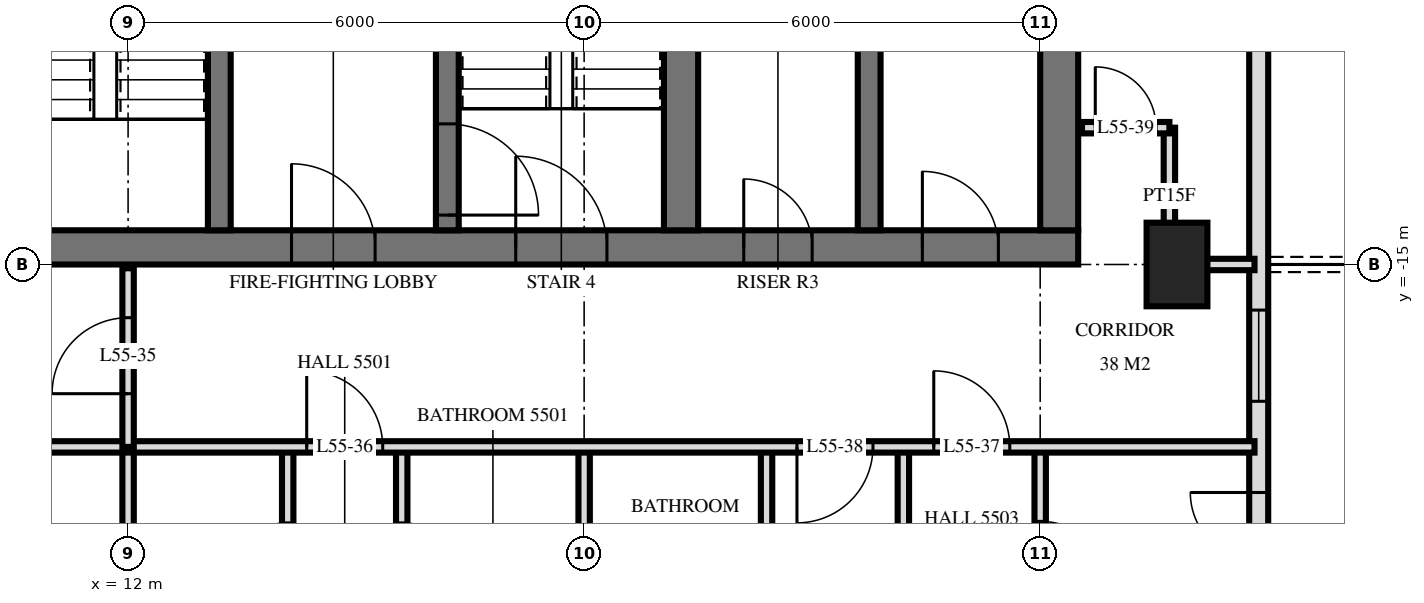
"""IFC4 building model, lengths in metres.
Left out: names, types, materials, properties, quantities, classifications, styles, units other than length and angle.
Written with IfcOpenShell. Run it as: python <this file> out.ifc"""

import sys

from ifc_helpers import new_model, si_unit, direction, frame, frame_2d, origin, origin_2d, place, context, subcontext, project, spatial, rectangle, extrude, element, fill, save


model = new_model("IFC4")
c1 = context("Model", 3, precision=1e-05, world=origin(), true_north=direction((0.0, 1.0)))
c2 = subcontext(c1, "Body", "Model", "MODEL_VIEW")
j1 = project(units=[si_unit("LENGTHUNIT", "METRE"), si_unit("PLANEANGLEUNIT", "RADIAN")], contexts=[c1])
p1 = place(None, origin())
s1 = spatial("IfcSite", under=j1, at=p1, CompositionType="ELEMENT")
p2 = place(p1, origin())
s2 = spatial("IfcBuilding", under=s1, at=p2, CompositionType="ELEMENT")
p3 = place(p2, frame((0.0, 0.0, 211.6)))
s3 = spatial("IfcBuildingStorey", under=s2, at=p3, CompositionType="ELEMENT", Elevation=211.6)
p4 = place(p3, frame((25.8, -15.0, 0.0), z_axis=(0.0, 0.0, 1.0), x_axis=(0.0, 1.0, 0.0)))
e1 = element("IfcColumn", 1, at=p4, inside=s3, PredefinedType="COLUMN", context=c2, shape_type="SweptSolid", body=[
    extrude(rectangle(XDim=1.1, YDim=0.8, at=origin_2d()), origin(), (0.0, 0.0, 1.0), 3.5),
])
p5 = place(p3, frame((10.0, -14.775, 0.0), z_axis=(0.0, 0.0, 1.0), x_axis=(1.0, 0.0, 0.0)))
e2 = element("IfcWall", 2, at=p5, inside=s3, PredefinedType="SHEAR", context=c2, shape_type="SweptSolid", body=[
    extrude(rectangle(XDim=14.5, YDim=0.45, at=frame_2d((7.25, 0.0))), origin(), (0.0, 0.0, 1.0), 3.5),
])
p6 = place(p5, frame((7.1, 0.0, 0.0)))
e3 = element("IfcOpeningElement", 3, at=p6, cuts=e2, PredefinedType="OPENING", context=c2, shape_type="SweptSolid", body=[
    extrude(rectangle(XDim=1.2, YDim=2.1, at=frame_2d((0.6, 1.05))), frame((0.0, 0.235, 0.0), z_axis=(0.0, -1.0, 0.0), x_axis=(1.0, 0.0, 0.0)), (0.0, 0.0, 1.0), 0.47),
])
p7 = place(p5, frame((4.15, 0.0, 0.0)))
e4 = element("IfcOpeningElement", 4, at=p7, cuts=e2, PredefinedType="OPENING", context=c2, shape_type="SweptSolid", body=[
    extrude(rectangle(XDim=1.1, YDim=2.1, at=frame_2d((0.55, 1.05))), frame((0.0, 0.235, 0.0), z_axis=(0.0, -1.0, 0.0), x_axis=(1.0, 0.0, 0.0)), (0.0, 0.0, 1.0), 0.47),
])
p8 = place(p5, frame((10.1, 0.0, 0.0)))
e5 = element("IfcOpeningElement", 5, at=p8, cuts=e2, PredefinedType="OPENING", context=c2, shape_type="SweptSolid", body=[
    extrude(rectangle(XDim=0.9, YDim=2.1, at=frame_2d((0.45, 1.05))), frame((0.0, 0.235, 0.0), z_axis=(0.0, -1.0, 0.0), x_axis=(1.0, 0.0, 0.0)), (0.0, 0.0, 1.0), 0.47),
])
p9 = place(p5, frame((12.45, 0.0, 0.0)))
e6 = element("IfcOpeningElement", 6, at=p9, cuts=e2, PredefinedType="OPENING", context=c2, shape_type="SweptSolid", body=[
    extrude(rectangle(XDim=1.0, YDim=2.1, at=frame_2d((0.5, 1.05))), frame((0.0, 0.235, 0.0), z_axis=(0.0, -1.0, 0.0), x_axis=(1.0, 0.0, 0.0)), (0.0, 0.0, 1.0), 0.47),
])
p10 = place(p3, frame((24.25, -14.55, 0.0), z_axis=(0.0, 0.0, 1.0), x_axis=(0.0, 1.0, 0.0)))
e7 = element("IfcWall", 7, at=p10, inside=s3, PredefinedType="SHEAR", context=c2, shape_type="SweptSolid", body=[
    extrude(rectangle(XDim=14.1, YDim=0.5, at=frame_2d((7.05, 0.0))), origin(), (0.0, 0.0, 1.0), 3.5),
])
p11 = place(p3, frame((13.2, -14.55, 0.0), z_axis=(0.0, 0.0, 1.0), x_axis=(0.0, 1.0, 0.0)))
e8 = element("IfcWall", 8, at=p11, inside=s3, PredefinedType="SHEAR", context=c2, shape_type="SweptSolid", body=[
    extrude(rectangle(XDim=5.4, YDim=0.3, at=frame_2d((2.7, 0.0))), origin(), (0.0, 0.0, 1.0), 3.5),
])
p12 = place(p11, frame((4.0, 0.0, 0.0)))
e9 = element("IfcOpeningElement", 9, at=p12, cuts=e8, PredefinedType="OPENING", context=c2, shape_type="SweptSolid", body=[
    extrude(rectangle(XDim=1.2, YDim=2.1, at=frame_2d((0.6, 1.05))), frame((0.0, 0.16, 0.0), z_axis=(0.0, -1.0, 0.0), x_axis=(1.0, 0.0, 0.0)), (0.0, 0.0, 1.0), 0.32),
])
p13 = place(p3, frame((16.2, -14.55, 0.0), z_axis=(0.0, 0.0, 1.0), x_axis=(0.0, 1.0, 0.0)))
e10 = element("IfcWall", 10, at=p13, inside=s3, PredefinedType="SHEAR", context=c2, shape_type="SweptSolid", body=[
    extrude(rectangle(XDim=5.4, YDim=0.3, at=frame_2d((2.7, 0.0))), origin(), (0.0, 0.0, 1.0), 3.5),
])
p14 = place(p13, frame((0.2, 0.0, 0.0)))
e11 = element("IfcOpeningElement", 11, at=p14, cuts=e10, PredefinedType="OPENING", context=c2, shape_type="SweptSolid", body=[
    extrude(rectangle(XDim=1.2, YDim=2.1, at=frame_2d((0.6, 1.05))), frame((0.0, 0.16, 0.0), z_axis=(0.0, -1.0, 0.0), x_axis=(1.0, 0.0, 0.0)), (0.0, 0.0, 1.0), 0.32),
])
p15 = place(p3, frame((19.275, -14.55, 0.0), z_axis=(0.0, 0.0, 1.0), x_axis=(0.0, 1.0, 0.0)))
e12 = element("IfcWall", 12, at=p15, inside=s3, PredefinedType="SHEAR", context=c2, shape_type="SweptSolid", body=[
    extrude(rectangle(XDim=5.4, YDim=0.45, at=frame_2d((2.7, 0.0))), origin(), (0.0, 0.0, 1.0), 3.5),
])
p16 = place(p3, frame((21.75, -14.55, 0.0), z_axis=(0.0, 0.0, 1.0), x_axis=(0.0, 1.0, 0.0)))
e13 = element("IfcWall", 13, at=p16, inside=s3, PredefinedType="SHEAR", context=c2, shape_type="SweptSolid", body=[
    extrude(rectangle(XDim=5.4, YDim=0.3, at=frame_2d((2.7, 0.0))), origin(), (0.0, 0.0, 1.0), 3.5),
])
p17 = place(p3, frame((26.875, -24.875, 0.0), z_axis=(0.0, 0.0, 1.0), x_axis=(0.0, 1.0, 0.0)))
e14 = element("IfcWall", 14, at=p17, inside=s3, PredefinedType="SOLIDWALL", context=c2, shape_type="SweptSolid", body=[
    extrude(rectangle(XDim=21.551, YDim=0.25, at=frame_2d((10.775, 0.0))), origin(), (0.0, 0.0, 1.0), 3.22),
])
p18 = place(p17, frame((0.575, 0.0, 0.0)))
e15 = element("IfcOpeningElement", 15, at=p18, cuts=e14, PredefinedType="OPENING", context=c2, shape_type="SweptSolid", body=[
    extrude(rectangle(XDim=1.8, YDim=2.4, at=frame_2d((0.9, 1.2))), frame((0.0, 0.135, 0.0), z_axis=(0.0, -1.0, 0.0), x_axis=(1.0, 0.0, 0.0)), (0.0, 0.0, 1.0), 0.27),
])
p19 = place(p17, frame((5.075, 0.0, 0.0)))
e16 = element("IfcOpeningElement", 16, at=p19, cuts=e14, PredefinedType="OPENING", context=c2, shape_type="SweptSolid", body=[
    extrude(rectangle(XDim=1.8, YDim=2.4, at=frame_2d((0.9, 1.2))), frame((0.0, 0.135, 0.0), z_axis=(0.0, -1.0, 0.0), x_axis=(1.0, 0.0, 0.0)), (0.0, 0.0, 1.0), 0.27),
])
p20 = place(p17, frame((8.075, 0.0, 0.9)))
e17 = element("IfcOpeningElement", 17, at=p20, cuts=e14, PredefinedType="OPENING", context=c2, shape_type="SweptSolid", body=[
    extrude(rectangle(XDim=1.2, YDim=1.5, at=frame_2d((0.6, 0.75))), frame((0.0, 0.135, 0.0), z_axis=(0.0, -1.0, 0.0), x_axis=(1.0, 0.0, 0.0)), (0.0, 0.0, 1.0), 0.27),
])
p21 = place(p17, frame((13.1, 0.0, 0.0)))
e18 = element("IfcOpeningElement", 18, at=p21, cuts=e14, PredefinedType="OPENING", context=c2, shape_type="SweptSolid", body=[
    extrude(rectangle(XDim=1.8, YDim=2.4, at=frame_2d((0.9, 1.2))), frame((0.0, 0.135, 0.0), z_axis=(0.0, -1.0, 0.0), x_axis=(1.0, 0.0, 0.0)), (0.0, 0.0, 1.0), 0.27),
])
p22 = place(p3, frame((25.7, -15.0, 0.0), z_axis=(0.0, 0.0, 1.0), x_axis=(0.0, 1.0, 0.0)))
e19 = element("IfcWall", 19, at=p22, inside=s3, PredefinedType="PARTITIONING", context=c2, shape_type="SweptSolid", body=[
    extrude(rectangle(XDim=1.8, YDim=0.15, at=frame_2d((0.9, 0.0))), origin(), (0.0, 0.0, 1.0), 3.22),
])
p23 = place(p3, frame((24.0, -20.4, 0.0), z_axis=(0.0, 0.0, 1.0), x_axis=(0.0, 1.0, 0.0)))
e20 = element("IfcWall", 20, at=p23, inside=s3, PredefinedType="PARTITIONING", context=c2, shape_type="SweptSolid", body=[
    extrude(rectangle(XDim=3.0, YDim=0.15, at=frame_2d((1.5, 0.0))), origin(), (0.0, 0.0, 1.0), 3.22),
])
p24 = place(p23, frame((1.02, 0.0, 0.0)))
e21 = element("IfcOpeningElement", 21, at=p24, cuts=e20, PredefinedType="OPENING", context=c2, shape_type="SweptSolid", body=[
    extrude(rectangle(XDim=1.0, YDim=2.1, at=frame_2d((0.5, 1.05))), frame((0.0, 0.085, 0.0), z_axis=(0.0, -1.0, 0.0), x_axis=(1.0, 0.0, 0.0)), (0.0, 0.0, 1.0), 0.17),
])
for number, where, z_axis, x_axis in (
    (22, (22.2, -20.4, 0.0), (0.0, 0.0, 1.0), (0.0, 1.0, 0.0)),
    (23, (20.4, -20.4, 0.0), (0.0, 0.0, 1.0), (0.0, 1.0, 0.0)),
):
    element("IfcWall", number, at=place(p3, frame(where, z_axis=z_axis, x_axis=x_axis)), inside=s3, PredefinedType="PARTITIONING", context=c2, shape_type="SweptSolid", body=[
        extrude(rectangle(XDim=3.0, YDim=0.15, at=frame_2d((1.5, 0.0))), origin(), (0.0, 0.0, 1.0), 3.22),
    ])
p25 = place(p3, frame((18.0, -29.22, 0.0), z_axis=(0.0, 0.0, 1.0), x_axis=(0.0, 1.0, 0.0)))
e24 = element("IfcWall", 24, at=p25, inside=s3, PredefinedType="PARTITIONING", context=c2, shape_type="SweptSolid", body=[
    extrude(rectangle(XDim=11.82, YDim=0.15, at=frame_2d((5.91, 0.0))), origin(), (0.0, 0.0, 1.0), 3.22),
])
p26 = place(p3, frame((15.6, -20.4, 0.0), z_axis=(0.0, 0.0, 1.0), x_axis=(0.0, 1.0, 0.0)))
e25 = element("IfcWall", 25, at=p26, inside=s3, PredefinedType="PARTITIONING", context=c2, shape_type="SweptSolid", body=[
    extrude(rectangle(XDim=3.0, YDim=0.15, at=frame_2d((1.5, 0.0))), origin(), (0.0, 0.0, 1.0), 3.22),
])
p27 = place(p26, frame((1.0, 0.0, 0.0)))
e26 = element("IfcOpeningElement", 26, at=p27, cuts=e25, PredefinedType="OPENING", context=c2, shape_type="SweptSolid", body=[
    extrude(rectangle(XDim=1.0, YDim=2.1, at=frame_2d((0.5, 1.05))), frame((0.0, 0.085, 0.0), z_axis=(0.0, -1.0, 0.0), x_axis=(1.0, 0.0, 0.0)), (0.0, 0.0, 1.0), 0.17),
])
p28 = place(p3, frame((14.1, -20.4, 0.0), z_axis=(0.0, 0.0, 1.0), x_axis=(0.0, 1.0, 0.0)))
e27 = element("IfcWall", 27, at=p28, inside=s3, PredefinedType="PARTITIONING", context=c2, shape_type="SweptSolid", body=[
    extrude(rectangle(XDim=3.0, YDim=0.15, at=frame_2d((1.5, 0.0))), origin(), (0.0, 0.0, 1.0), 3.22),
])
p29 = place(p28, frame((1.0, 0.0, 0.0)))
e28 = element("IfcOpeningElement", 28, at=p29, cuts=e27, PredefinedType="OPENING", context=c2, shape_type="SweptSolid", body=[
    extrude(rectangle(XDim=1.0, YDim=2.1, at=frame_2d((0.5, 1.05))), frame((0.0, 0.085, 0.0), z_axis=(0.0, -1.0, 0.0), x_axis=(1.0, 0.0, 0.0)), (0.0, 0.0, 1.0), 0.17),
])
p30 = place(p3, frame((12.0, -17.4, 0.0), z_axis=(0.0, 0.0, 1.0), x_axis=(0.0, 1.0, 0.0)))
e29 = element("IfcWall", 29, at=p30, inside=s3, PredefinedType="PARTITIONING", context=c2, shape_type="SweptSolid", body=[
    extrude(rectangle(XDim=2.35, YDim=0.15, at=frame_2d((1.175, 0.0))), origin(), (0.0, 0.0, 1.0), 3.22),
])
p31 = place(p30, frame((0.7, 0.0, 0.0)))
e30 = element("IfcOpeningElement", 30, at=p31, cuts=e29, PredefinedType="OPENING", context=c2, shape_type="SweptSolid", body=[
    extrude(rectangle(XDim=1.0, YDim=2.1, at=frame_2d((0.5, 1.05))), frame((0.0, 0.085, 0.0), z_axis=(0.0, -1.0, 0.0), x_axis=(1.0, 0.0, 0.0)), (0.0, 0.0, 1.0), 0.17),
])
p32 = place(p3, frame((12.0, -29.22, 0.0), z_axis=(0.0, 0.0, 1.0), x_axis=(0.0, 1.0, 0.0)))
e31 = element("IfcWall", 31, at=p32, inside=s3, PredefinedType="PARTITIONING", context=c2, shape_type="SweptSolid", body=[
    extrude(rectangle(XDim=11.82, YDim=0.15, at=frame_2d((5.91, 0.0))), origin(), (0.0, 0.0, 1.0), 3.22),
])
p33 = place(p3, frame((-26.82, -17.4, 0.0), z_axis=(0.0, 0.0, 1.0), x_axis=(1.0, 0.0, 0.0)))
e32 = element("IfcWall", 32, at=p33, inside=s3, PredefinedType="PARTITIONING", context=c2, shape_type="SweptSolid", body=[
    extrude(rectangle(XDim=53.64, YDim=0.15, at=frame_2d((26.82, 0.0))), origin(), (0.0, 0.0, 1.0), 3.22),
])
p34 = place(p33, frame((4.92, 0.0, 0.0)))
e33 = element("IfcOpeningElement", 33, at=p34, cuts=e32, PredefinedType="OPENING", context=c2, shape_type="SweptSolid", body=[
    extrude(rectangle(XDim=1.0, YDim=2.1, at=frame_2d((0.5, 1.05))), frame((0.0, 0.085, 0.0), z_axis=(0.0, -1.0, 0.0), x_axis=(1.0, 0.0, 0.0)), (0.0, 0.0, 1.0), 0.17),
])
p35 = place(p33, frame((1.62, 0.0, 0.0)))
e34 = element("IfcOpeningElement", 34, at=p35, cuts=e32, PredefinedType="OPENING", context=c2, shape_type="SweptSolid", body=[
    extrude(rectangle(XDim=1.0, YDim=2.1, at=frame_2d((0.5, 1.05))), frame((0.0, 0.085, 0.0), z_axis=(0.0, -1.0, 0.0), x_axis=(1.0, 0.0, 0.0)), (0.0, 0.0, 1.0), 0.17),
])
p36 = place(p33, frame((41.17, 0.0, 0.0)))
e35 = element("IfcOpeningElement", 35, at=p36, cuts=e32, PredefinedType="OPENING", context=c2, shape_type="SweptSolid", body=[
    extrude(rectangle(XDim=1.0, YDim=2.1, at=frame_2d((0.5, 1.05))), frame((0.0, 0.085, 0.0), z_axis=(0.0, -1.0, 0.0), x_axis=(1.0, 0.0, 0.0)), (0.0, 0.0, 1.0), 0.17),
])
p37 = place(p33, frame((49.42, 0.0, 0.0)))
e36 = element("IfcOpeningElement", 36, at=p37, cuts=e32, PredefinedType="OPENING", context=c2, shape_type="SweptSolid", body=[
    extrude(rectangle(XDim=1.0, YDim=2.1, at=frame_2d((0.5, 1.05))), frame((0.0, 0.085, 0.0), z_axis=(0.0, -1.0, 0.0), x_axis=(1.0, 0.0, 0.0)), (0.0, 0.0, 1.0), 0.17),
])
p38 = place(p33, frame((47.62, 0.0, 0.0)))
e37 = element("IfcOpeningElement", 37, at=p38, cuts=e32, PredefinedType="OPENING", context=c2, shape_type="SweptSolid", body=[
    extrude(rectangle(XDim=1.0, YDim=2.1, at=frame_2d((0.5, 1.05))), frame((0.0, 0.085, 0.0), z_axis=(0.0, -1.0, 0.0), x_axis=(1.0, 0.0, 0.0)), (0.0, 0.0, 1.0), 0.17),
])
p39 = place(p33, frame((21.82, 0.0, 0.0)))
e38 = element("IfcOpeningElement", 38, at=p39, cuts=e32, PredefinedType="OPENING", context=c2, shape_type="SweptSolid", body=[
    extrude(rectangle(XDim=1.0, YDim=2.1, at=frame_2d((0.5, 1.05))), frame((0.0, 0.085, 0.0), z_axis=(0.0, -1.0, 0.0), x_axis=(1.0, 0.0, 0.0)), (0.0, 0.0, 1.0), 0.17),
])
p40 = place(p33, frame((33.82, 0.0, 0.0)))
e39 = element("IfcOpeningElement", 39, at=p40, cuts=e32, PredefinedType="OPENING", context=c2, shape_type="SweptSolid", body=[
    extrude(rectangle(XDim=1.0, YDim=2.1, at=frame_2d((0.5, 1.05))), frame((0.0, 0.085, 0.0), z_axis=(0.0, -1.0, 0.0), x_axis=(1.0, 0.0, 0.0)), (0.0, 0.0, 1.0), 0.17),
])
p41 = place(p3, frame((25.7, -15.0, 0.0), z_axis=(0.0, 0.0, 1.0), x_axis=(1.0, 0.0, 0.0)))
e40 = element("IfcWall", 40, at=p41, inside=s3, PredefinedType="PARTITIONING", context=c2, shape_type="SweptSolid", body=[
    extrude(rectangle(XDim=1.12, YDim=0.15, at=frame_2d((0.56, 0.0))), origin(), (0.0, 0.0, 1.0), 3.22),
])
p42 = place(p3, frame((24.55, -13.2, 0.0), z_axis=(0.0, 0.0, 1.0), x_axis=(1.0, 0.0, 0.0)))
e41 = element("IfcWall", 41, at=p42, inside=s3, PredefinedType="PARTITIONING", context=c2, shape_type="SweptSolid", body=[
    extrude(rectangle(XDim=1.15, YDim=0.15, at=frame_2d((0.575, 0.0))), origin(), (0.0, 0.0, 1.0), 3.22),
])
p43 = place(p42, frame((0.175, 0.0, 0.0)))
e42 = element("IfcOpeningElement", 42, at=p43, cuts=e41, PredefinedType="OPENING", context=c2, shape_type="SweptSolid", body=[
    extrude(rectangle(XDim=0.8, YDim=2.1, at=frame_2d((0.4, 1.05))), frame((0.0, 0.085, 0.0), z_axis=(0.0, -1.0, 0.0), x_axis=(1.0, 0.0, 0.0)), (0.0, 0.0, 1.0), 0.17),
])
p44 = place(p19, origin())
e43 = element("IfcDoor", 43, at=p44, inside=s3, OperationType="DOUBLE_DOOR_SINGLE_SWING", PredefinedType="DOOR", context=c2, shape_type="SweptSolid", body=[
    extrude(rectangle(XDim=1.8, YDim=2.4, at=frame_2d((0.9, 1.2))), frame((0.0, 0.025, 0.0), z_axis=(0.0, -1.0, 0.0), x_axis=(1.0, 0.0, 0.0)), (0.0, 0.0, 1.0), 0.05),
])
fill(e16, e43)
p45 = place(p20, origin())
e44 = element("IfcWindow", 44, at=p45, inside=s3, PartitioningType="SINGLE_PANEL", PredefinedType="WINDOW", context=c2, shape_type="SweptSolid", body=[
    extrude(rectangle(XDim=1.2, YDim=1.5, at=frame_2d((0.6, 0.75))), frame((0.0, 0.03, 0.0), z_axis=(0.0, -1.0, 0.0), x_axis=(1.0, 0.0, 0.0)), (0.0, 0.0, 1.0), 0.06),
])
fill(e17, e44)
p46 = place(p6, origin())
e45 = element("IfcDoor", 45, at=p46, inside=s3, OperationType="SINGLE_SWING_RIGHT", PredefinedType="DOOR", context=c2, shape_type="SweptSolid", body=[
    extrude(rectangle(XDim=1.2, YDim=2.1, at=frame_2d((0.6, 1.05))), frame((0.0, 0.025, 0.0), z_axis=(0.0, -1.0, 0.0), x_axis=(1.0, 0.0, 0.0)), (0.0, 0.0, 1.0), 0.05),
])
fill(e3, e45)
p47 = place(p7, origin())
e46 = element("IfcDoor", 46, at=p47, inside=s3, OperationType="SINGLE_SWING_RIGHT", PredefinedType="DOOR", context=c2, shape_type="SweptSolid", body=[
    extrude(rectangle(XDim=1.1, YDim=2.1, at=frame_2d((0.55, 1.05))), frame((0.0, 0.025, 0.0), z_axis=(0.0, -1.0, 0.0), x_axis=(1.0, 0.0, 0.0)), (0.0, 0.0, 1.0), 0.05),
])
fill(e4, e46)
p48 = place(p8, origin())
e47 = element("IfcDoor", 47, at=p48, inside=s3, OperationType="SINGLE_SWING_RIGHT", PredefinedType="DOOR", context=c2, shape_type="SweptSolid", body=[
    extrude(rectangle(XDim=0.9, YDim=2.1, at=frame_2d((0.45, 1.05))), frame((0.0, 0.025, 0.0), z_axis=(0.0, -1.0, 0.0), x_axis=(1.0, 0.0, 0.0)), (0.0, 0.0, 1.0), 0.05),
])
fill(e5, e47)
p49 = place(p9, origin())
e48 = element("IfcDoor", 48, at=p49, inside=s3, OperationType="SINGLE_SWING_RIGHT", PredefinedType="DOOR", context=c2, shape_type="SweptSolid", body=[
    extrude(rectangle(XDim=1.0, YDim=2.1, at=frame_2d((0.5, 1.05))), frame((0.0, 0.025, 0.0), z_axis=(0.0, -1.0, 0.0), x_axis=(1.0, 0.0, 0.0)), (0.0, 0.0, 1.0), 0.05),
])
fill(e6, e48)
p50 = place(p14, frame((0.6, 0.0, 0.0), z_axis=(0.0, 0.0, 1.0), x_axis=(-1.0, 0.0, 0.0)))
e49 = element("IfcDoor", 49, at=p50, inside=s3, OperationType="SINGLE_SWING_LEFT", PredefinedType="DOOR", context=c2, shape_type="SweptSolid", body=[
    extrude(rectangle(XDim=1.2, YDim=2.1, at=frame_2d((0.0, 1.05))), frame((0.0, -0.025, 0.0), z_axis=(0.0, 1.0, 0.0), x_axis=(-1.0, 0.0, 0.0)), (0.0, 0.0, 1.0), 0.05),
])
fill(e11, e49)
p51 = place(p31, origin())
e50 = element("IfcDoor", 50, at=p51, inside=s3, OperationType="SINGLE_SWING_RIGHT", PredefinedType="DOOR", context=c2, shape_type="SweptSolid", body=[
    extrude(rectangle(XDim=1.0, YDim=2.1, at=frame_2d((0.5, 1.05))), frame((0.0, 0.025, 0.0), z_axis=(0.0, -1.0, 0.0), x_axis=(1.0, 0.0, 0.0)), (0.0, 0.0, 1.0), 0.05),
])
fill(e30, e50)
p52 = place(p36, origin())
e51 = element("IfcDoor", 51, at=p52, inside=s3, OperationType="SINGLE_SWING_RIGHT", PredefinedType="DOOR", context=c2, shape_type="SweptSolid", body=[
    extrude(rectangle(XDim=1.0, YDim=2.1, at=frame_2d((0.5, 1.05))), frame((0.0, 0.025, 0.0), z_axis=(0.0, -1.0, 0.0), x_axis=(1.0, 0.0, 0.0)), (0.0, 0.0, 1.0), 0.05),
])
fill(e35, e51)
p53 = place(p37, origin())
e52 = element("IfcDoor", 52, at=p53, inside=s3, OperationType="SINGLE_SWING_RIGHT", PredefinedType="DOOR", context=c2, shape_type="SweptSolid", body=[
    extrude(rectangle(XDim=1.0, YDim=2.1, at=frame_2d((0.5, 1.05))), frame((0.0, 0.025, 0.0), z_axis=(0.0, -1.0, 0.0), x_axis=(1.0, 0.0, 0.0)), (0.0, 0.0, 1.0), 0.05),
])
fill(e36, e52)
p54 = place(p38, frame((0.5, 0.0, 0.0), z_axis=(0.0, 0.0, 1.0), x_axis=(-1.0, 0.0, 0.0)))
e53 = element("IfcDoor", 53, at=p54, inside=s3, OperationType="SINGLE_SWING_LEFT", PredefinedType="DOOR", context=c2, shape_type="SweptSolid", body=[
    extrude(rectangle(XDim=1.0, YDim=2.1, at=frame_2d((0.0, 1.05))), frame((0.0, -0.025, 0.0), z_axis=(0.0, 1.0, 0.0), x_axis=(-1.0, 0.0, 0.0)), (0.0, 0.0, 1.0), 0.05),
])
fill(e37, e53)
p55 = place(p43, origin())
e54 = element("IfcDoor", 54, at=p55, inside=s3, OperationType="SINGLE_SWING_RIGHT", PredefinedType="DOOR", context=c2, shape_type="SweptSolid", body=[
    extrude(rectangle(XDim=0.8, YDim=2.1, at=frame_2d((0.4, 1.05))), frame((0.0, 0.025, 0.0), z_axis=(0.0, -1.0, 0.0), x_axis=(1.0, 0.0, 0.0)), (0.0, 0.0, 1.0), 0.05),
])
fill(e42, e54)
p56 = place(p24, frame((0.5, 0.0, 0.0), z_axis=(0.0, 0.0, 1.0), x_axis=(-1.0, 0.0, 0.0)))
e55 = element("IfcDoor", 55, at=p56, inside=s3, OperationType="SINGLE_SWING_LEFT", PredefinedType="DOOR", context=c2, shape_type="SweptSolid", body=[
    extrude(rectangle(XDim=1.0, YDim=2.1, at=frame_2d((0.0, 1.05))), frame((0.0, -0.025, 0.0), z_axis=(0.0, 1.0, 0.0), x_axis=(-1.0, 0.0, 0.0)), (0.0, 0.0, 1.0), 0.05),
])
fill(e21, e55)
save(model, sys.argv[1])
